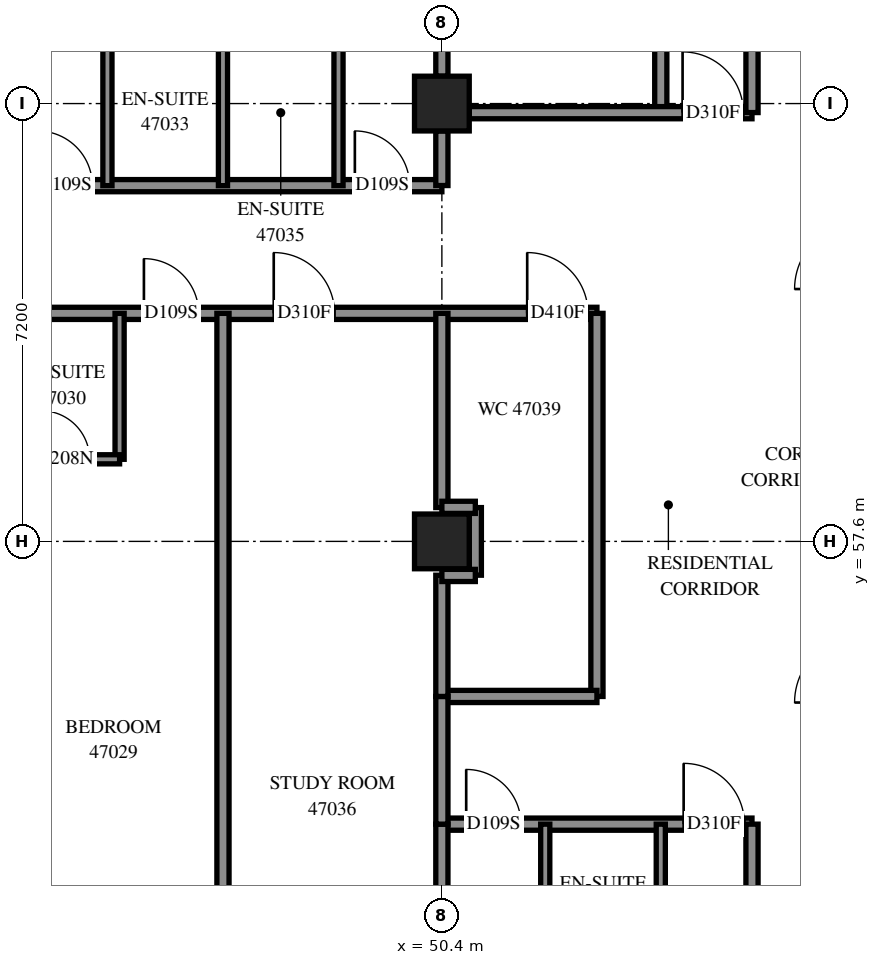
"""IFC4 building model, lengths in metres.
Left out: names, types, materials, properties, quantities, classifications, styles, units other than length and angle.
Written with IfcOpenShell. Run it as: python <this file> out.ifc"""

import sys

from ifc_helpers import new_model, si_unit, direction, frame, frame_2d, origin, origin_2d, place, context, subcontext, project, spatial, rectangle, extrude, element, fill, save


model = new_model("IFC4")
c1 = context("Model", 3, precision=1e-05, world=origin(), true_north=direction((0.0, 1.0)))
c2 = subcontext(c1, "Body", "Model", "MODEL_VIEW")
j1 = project(units=[si_unit("LENGTHUNIT", "METRE"), si_unit("PLANEANGLEUNIT", "RADIAN")], contexts=[c1])
p1 = place(None, origin())
s1 = spatial("IfcSite", under=j1, at=p1, CompositionType="ELEMENT")
p2 = place(p1, origin())
s2 = spatial("IfcBuilding", under=s1, at=p2, CompositionType="ELEMENT")
p3 = place(p2, frame((0.0, 0.0, 172.8)))
s3 = spatial("IfcBuildingStorey", under=s2, at=p3, CompositionType="ELEMENT", Elevation=172.8)
for number, where, z_axis, x_axis in (
    (1, (50.4, 57.6, 0.0), (0.0, 0.0, 1.0), (1.0, 0.0, 0.0)),
    (2, (50.4, 64.8, 0.0), (0.0, 0.0, 1.0), (1.0, 0.0, 0.0)),
):
    element("IfcColumn", number, at=place(p3, frame(where, z_axis=z_axis, x_axis=x_axis)), inside=s3, PredefinedType="COLUMN", context=c2, shape_type="SweptSolid", body=[
        extrude(rectangle(XDim=0.9, YDim=0.9, at=origin_2d()), origin(), (0.0, 0.0, 1.0), 3.1),
    ])
p4 = place(p3, frame((36.0, 61.35, 0.0), z_axis=(0.0, 0.0, 1.0), x_axis=(1.0, 0.0, 0.0)))
e3 = element("IfcWall", 3, at=p4, inside=s3, PredefinedType="PARTITIONING", context=c2, shape_type="SweptSolid", body=[
    extrude(rectangle(XDim=16.95, YDim=0.2, at=frame_2d((8.475, 0.0))), origin(), (0.0, 0.0, 1.0), 3.1),
])
p5 = place(p4, frame((2.3, 0.0, 0.0)))
e4 = element("IfcOpeningElement", 4, at=p5, cuts=e3, PredefinedType="OPENING", context=c2, shape_type="SweptSolid", body=[
    extrude(rectangle(XDim=0.9, YDim=2.1, at=frame_2d((0.45, 1.05))), frame((0.0, 0.11, 0.0), z_axis=(0.0, -1.0, 0.0), x_axis=(1.0, 0.0, 0.0)), (0.0, 0.0, 1.0), 0.22),
])
p6 = place(p4, frame((4.125, 0.0, 0.0)))
e5 = element("IfcOpeningElement", 5, at=p6, cuts=e3, PredefinedType="OPENING", context=c2, shape_type="SweptSolid", body=[
    extrude(rectangle(XDim=1.0, YDim=2.1, at=frame_2d((0.5, 1.05))), frame((0.0, 0.11, 0.0), z_axis=(0.0, -1.0, 0.0), x_axis=(1.0, 0.0, 0.0)), (0.0, 0.0, 1.0), 0.22),
])
p7 = place(p4, frame((9.5, 0.0, 0.0)))
e6 = element("IfcOpeningElement", 6, at=p7, cuts=e3, PredefinedType="OPENING", context=c2, shape_type="SweptSolid", body=[
    extrude(rectangle(XDim=0.9, YDim=2.1, at=frame_2d((0.45, 1.05))), frame((0.0, 0.11, 0.0), z_axis=(0.0, -1.0, 0.0), x_axis=(1.0, 0.0, 0.0)), (0.0, 0.0, 1.0), 0.22),
])
p8 = place(p4, frame((11.635, 0.0, 0.0)))
e7 = element("IfcOpeningElement", 7, at=p8, cuts=e3, PredefinedType="OPENING", context=c2, shape_type="SweptSolid", body=[
    extrude(rectangle(XDim=1.0, YDim=2.1, at=frame_2d((0.5, 1.05))), frame((0.0, 0.11, 0.0), z_axis=(0.0, -1.0, 0.0), x_axis=(1.0, 0.0, 0.0)), (0.0, 0.0, 1.0), 0.22),
])
p9 = place(p4, frame((15.803, 0.0, 0.0)))
e8 = element("IfcOpeningElement", 8, at=p9, cuts=e3, PredefinedType="OPENING", context=c2, shape_type="SweptSolid", body=[
    extrude(rectangle(XDim=1.0, YDim=2.1, at=frame_2d((0.5, 1.05))), frame((0.0, 0.11, 0.0), z_axis=(0.0, -1.0, 0.0), x_axis=(1.0, 0.0, 0.0)), (0.0, 0.0, 1.0), 0.22),
])
p10 = place(p3, frame((46.8, 49.7, 0.0), z_axis=(0.0, 0.0, 1.0), x_axis=(0.0, 1.0, 0.0)))
e9 = element("IfcWall", 9, at=p10, inside=s3, PredefinedType="PARTITIONING", context=c2, shape_type="SweptSolid", body=[
    extrude(rectangle(XDim=11.65, YDim=0.2, at=frame_2d((5.825, 0.0))), origin(), (0.0, 0.0, 1.0), 3.1),
])
p11 = place(p3, frame((40.65, 63.45, 0.0), z_axis=(0.0, 0.0, 1.0), x_axis=(1.0, 0.0, 0.0)))
e10 = element("IfcWall", 10, at=p11, inside=s3, PredefinedType="PARTITIONING", context=c2, shape_type="SweptSolid", body=[
    extrude(rectangle(XDim=9.75, YDim=0.2, at=frame_2d((4.875, 0.0))), origin(), (0.0, 0.0, 1.0), 3.1),
])
p12 = place(p11, frame((0.144, 0.0, 0.0)))
e11 = element("IfcOpeningElement", 11, at=p12, cuts=e10, PredefinedType="OPENING", context=c2, shape_type="SweptSolid", body=[
    extrude(rectangle(XDim=1.0, YDim=2.1, at=frame_2d((0.5, 1.05))), frame((0.0, 0.11, 0.0), z_axis=(0.0, -1.0, 0.0), x_axis=(1.0, 0.0, 0.0)), (0.0, 0.0, 1.0), 0.22),
])
p13 = place(p11, frame((3.102, 0.0, 0.0)))
e12 = element("IfcOpeningElement", 12, at=p13, cuts=e10, PredefinedType="OPENING", context=c2, shape_type="SweptSolid", body=[
    extrude(rectangle(XDim=0.9, YDim=2.1, at=frame_2d((0.45, 1.05))), frame((0.0, 0.11, 0.0), z_axis=(0.0, -1.0, 0.0), x_axis=(1.0, 0.0, 0.0)), (0.0, 0.0, 1.0), 0.22),
])
p14 = place(p11, frame((8.319, 0.0, 0.0)))
e13 = element("IfcOpeningElement", 13, at=p14, cuts=e10, PredefinedType="OPENING", context=c2, shape_type="SweptSolid", body=[
    extrude(rectangle(XDim=0.9, YDim=2.1, at=frame_2d((0.45, 1.05))), frame((0.0, 0.11, 0.0), z_axis=(0.0, -1.0, 0.0), x_axis=(1.0, 0.0, 0.0)), (0.0, 0.0, 1.0), 0.22),
])
p15 = place(p3, frame((54.0, 64.65, 0.0), z_axis=(0.0, 0.0, 1.0), x_axis=(0.0, 1.0, 0.0)))
e14 = element("IfcWall", 14, at=p15, inside=s3, PredefinedType="PARTITIONING", context=c2, shape_type="SweptSolid", body=[
    extrude(rectangle(XDim=8.126, YDim=0.2, at=frame_2d((4.063, 0.0))), origin(), (0.0, 0.0, 1.0), 3.1),
])
for number, where, z_axis, x_axis in (
    (15, (52.95, 55.05, 0.0), (0.0, 0.0, 1.0), (0.0, 1.0, 0.0)),
    (16, (50.4, 65.25, 0.0), (0.0, 0.0, 1.0), (0.0, 1.0, 0.0)),
):
    element("IfcWall", number, at=place(p3, frame(where, z_axis=z_axis, x_axis=x_axis)), inside=s3, PredefinedType="PARTITIONING", context=c2, shape_type="SweptSolid", body=[
        extrude(rectangle(XDim=6.3, YDim=0.2, at=frame_2d((3.15, 0.0))), origin(), (0.0, 0.0, 1.0), 3.1),
    ])
p16 = place(p3, frame((50.4, 52.95, 0.0), z_axis=(0.0, 0.0, 1.0), x_axis=(1.0, 0.0, 0.0)))
e17 = element("IfcWall", 17, at=p16, inside=s3, PredefinedType="PARTITIONING", context=c2, shape_type="SweptSolid", body=[
    extrude(rectangle(XDim=5.1, YDim=0.2, at=frame_2d((2.55, 0.0))), origin(), (0.0, 0.0, 1.0), 3.1),
])
p17 = place(p16, frame((0.4, 0.0, 0.0)))
e18 = element("IfcOpeningElement", 18, at=p17, cuts=e17, PredefinedType="OPENING", context=c2, shape_type="SweptSolid", body=[
    extrude(rectangle(XDim=0.9, YDim=2.1, at=frame_2d((0.45, 1.05))), frame((0.0, 0.11, 0.0), z_axis=(0.0, -1.0, 0.0), x_axis=(1.0, 0.0, 0.0)), (0.0, 0.0, 1.0), 0.22),
])
p18 = place(p16, frame((3.976, 0.0, 0.0)))
e19 = element("IfcOpeningElement", 19, at=p18, cuts=e17, PredefinedType="OPENING", context=c2, shape_type="SweptSolid", body=[
    extrude(rectangle(XDim=1.0, YDim=2.1, at=frame_2d((0.5, 1.05))), frame((0.0, 0.11, 0.0), z_axis=(0.0, -1.0, 0.0), x_axis=(1.0, 0.0, 0.0)), (0.0, 0.0, 1.0), 0.22),
])
p19 = place(p3, frame((55.5, 48.3, 0.0), z_axis=(0.0, 0.0, 1.0), x_axis=(0.0, 1.0, 0.0)))
e20 = element("IfcWall", 20, at=p19, inside=s3, PredefinedType="PARTITIONING", context=c2, shape_type="SweptSolid", body=[
    extrude(rectangle(XDim=4.65, YDim=0.2, at=frame_2d((2.325, 0.0))), origin(), (0.0, 0.0, 1.0), 3.1),
])
p20 = place(p3, frame((50.85, 64.65, 0.0), z_axis=(0.0, 0.0, 1.0), x_axis=(1.0, 0.0, 0.0)))
e21 = element("IfcWall", 21, at=p20, inside=s3, PredefinedType="PARTITIONING", context=c2, shape_type="SweptSolid", body=[
    extrude(rectangle(XDim=4.65, YDim=0.2, at=frame_2d((2.325, 0.0))), origin(), (0.0, 0.0, 1.0), 3.1),
])
p21 = place(p20, frame((3.509, 0.0, 0.0)))
e22 = element("IfcOpeningElement", 22, at=p21, cuts=e21, PredefinedType="OPENING", context=c2, shape_type="SweptSolid", body=[
    extrude(rectangle(XDim=1.0, YDim=2.1, at=frame_2d((0.5, 1.05))), frame((0.0, 0.11, 0.0), z_axis=(0.0, -1.0, 0.0), x_axis=(1.0, 0.0, 0.0)), (0.0, 0.0, 1.0), 0.22),
])
p22 = place(p3, frame((50.4, 58.156, 0.0), z_axis=(0.0, 0.0, 1.0), x_axis=(0.0, 1.0, 0.0)))
e23 = element("IfcWall", 23, at=p22, inside=s3, PredefinedType="PARTITIONING", context=c2, shape_type="SweptSolid", body=[
    extrude(rectangle(XDim=3.194, YDim=0.2, at=frame_2d((1.597, 0.0))), origin(), (0.0, 0.0, 1.0), 3.1),
])
p23 = place(p3, frame((50.4, 55.05, 0.0), z_axis=(0.0, 0.0, 1.0), x_axis=(1.0, 0.0, 0.0)))
e24 = element("IfcWall", 24, at=p23, inside=s3, PredefinedType="PARTITIONING", context=c2, shape_type="SweptSolid", body=[
    extrude(rectangle(XDim=2.55, YDim=0.2, at=frame_2d((1.275, 0.0))), origin(), (0.0, 0.0, 1.0), 3.1),
])
for number, where, z_axis, x_axis in (
    (25, (52.1, 50.55, 0.0), (0.0, 0.0, 1.0), (0.0, 1.0, 0.0)),
    (26, (54.0, 50.55, 0.0), (0.0, 0.0, 1.0), (0.0, 1.0, 0.0)),
    (27, (45.1, 58.95, 0.0), (0.0, 0.0, 1.0), (0.0, 1.0, 0.0)),
    (28, (44.9, 63.45, 0.0), (0.0, 0.0, 1.0), (0.0, 1.0, 0.0)),
    (29, (46.8, 63.45, 0.0), (0.0, 0.0, 1.0), (0.0, 1.0, 0.0)),
    (30, (48.7, 63.45, 0.0), (0.0, 0.0, 1.0), (0.0, 1.0, 0.0)),
):
    element("IfcWall", number, at=place(p3, frame(where, z_axis=z_axis, x_axis=x_axis)), inside=s3, PredefinedType="PARTITIONING", context=c2, shape_type="SweptSolid", body=[
        extrude(rectangle(XDim=2.4, YDim=0.15, at=frame_2d((1.2, 0.0))), origin(), (0.0, 0.0, 1.0), 3.1),
    ])
p24 = place(p3, frame((55.5, 64.652, 0.0), z_axis=(0.0, 0.0, 1.0), x_axis=(0.0, 1.0, 0.0)))
e31 = element("IfcWall", 31, at=p24, inside=s3, PredefinedType="PARTITIONING", context=c2, shape_type="SweptSolid", body=[
    extrude(rectangle(XDim=2.248, YDim=0.2, at=frame_2d((1.124, 0.0))), origin(), (0.0, 0.0, 1.0), 3.1),
])
for number, where, z_axis, x_axis in (
    (32, (50.4, 50.85, 0.0), (0.0, 0.0, 1.0), (0.0, 1.0, 0.0)),
    (33, (50.4, 52.95, 0.0), (0.0, 0.0, 1.0), (0.0, 1.0, 0.0)),
):
    element("IfcWall", number, at=place(p3, frame(where, z_axis=z_axis, x_axis=x_axis)), inside=s3, PredefinedType="PARTITIONING", context=c2, shape_type="SweptSolid", body=[
        extrude(rectangle(XDim=2.1, YDim=0.2, at=frame_2d((1.05, 0.0))), origin(), (0.0, 0.0, 1.0), 3.1),
    ])
p25 = place(p3, frame((50.4, 55.05, 0.0), z_axis=(0.0, 0.0, 1.0), x_axis=(0.0, 1.0, 0.0)))
e34 = element("IfcWall", 34, at=p25, inside=s3, PredefinedType="PARTITIONING", context=c2, shape_type="SweptSolid", body=[
    extrude(rectangle(XDim=1.994, YDim=0.2, at=frame_2d((0.997, 0.0))), origin(), (0.0, 0.0, 1.0), 3.1),
])
p26 = place(p3, frame((43.2, 58.95, 0.0), z_axis=(0.0, 0.0, 1.0), x_axis=(1.0, 0.0, 0.0)))
e35 = element("IfcWall", 35, at=p26, inside=s3, PredefinedType="PARTITIONING", context=c2, shape_type="SweptSolid", body=[
    extrude(rectangle(XDim=1.9, YDim=0.15, at=frame_2d((0.95, 0.0))), origin(), (0.0, 0.0, 1.0), 3.1),
])
p27 = place(p26, frame((0.607, 0.0, 0.0)))
e36 = element("IfcOpeningElement", 36, at=p27, cuts=e35, PredefinedType="OPENING", context=c2, shape_type="SweptSolid", body=[
    extrude(rectangle(XDim=0.8, YDim=2.1, at=frame_2d((0.4, 1.05))), frame((0.0, 0.085, 0.0), z_axis=(0.0, -1.0, 0.0), x_axis=(1.0, 0.0, 0.0)), (0.0, 0.0, 1.0), 0.17),
])
p28 = place(p3, frame((50.95, 57.044, 0.0), z_axis=(0.0, 0.0, 1.0), x_axis=(0.0, 1.0, 0.0)))
e37 = element("IfcWall", 37, at=p28, inside=s3, PredefinedType="PARTITIONING", context=c2, shape_type="SweptSolid", body=[
    extrude(rectangle(XDim=1.112, YDim=0.2, at=frame_2d((0.556, 0.0))), origin(), (0.0, 0.0, 1.0), 3.1),
])
p29 = place(p3, frame((50.4, 63.452, 0.0), z_axis=(0.0, 0.0, 1.0), x_axis=(0.0, 1.0, 0.0)))
e38 = element("IfcWall", 38, at=p29, inside=s3, PredefinedType="PARTITIONING", context=c2, shape_type="SweptSolid", body=[
    extrude(rectangle(XDim=0.898, YDim=0.2, at=frame_2d((0.449, 0.0))), origin(), (0.0, 0.0, 1.0), 3.1),
])
for number, where, z_axis, x_axis in (
    (39, (50.4, 58.16, 0.0), (0.0, 0.0, 1.0), (1.0, 0.0, 0.0)),
    (40, (50.4, 57.04, 0.0), (0.0, 0.0, 1.0), (1.0, 0.0, 0.0)),
):
    element("IfcWall", number, at=place(p3, frame(where, z_axis=z_axis, x_axis=x_axis)), inside=s3, PredefinedType="PARTITIONING", context=c2, shape_type="SweptSolid", body=[
        extrude(rectangle(XDim=0.55, YDim=0.2, at=frame_2d((0.275, 0.0))), origin(), (0.0, 0.0, 1.0), 3.1),
    ])
p30 = place(p7, origin())
e41 = element("IfcDoor", 41, at=p30, inside=s3, OperationType="SINGLE_SWING_LEFT", PredefinedType="DOOR", context=c2, shape_type="SweptSolid", body=[
    extrude(rectangle(XDim=0.9, YDim=2.1, at=frame_2d((0.45, 1.05))), frame((0.0, 0.025, 0.0), z_axis=(0.0, -1.0, 0.0), x_axis=(1.0, 0.0, 0.0)), (0.0, 0.0, 1.0), 0.05),
])
fill(e6, e41)
p31 = place(p27, origin())
e42 = element("IfcDoor", 42, at=p31, inside=s3, OperationType="SINGLE_SWING_RIGHT", PredefinedType="DOOR", context=c2, shape_type="SweptSolid", body=[
    extrude(rectangle(XDim=0.8, YDim=2.1, at=frame_2d((0.4, 1.05))), frame((0.0, 0.025, 0.0), z_axis=(0.0, -1.0, 0.0), x_axis=(1.0, 0.0, 0.0)), (0.0, 0.0, 1.0), 0.05),
])
fill(e36, e42)
p32 = place(p13, origin())
e43 = element("IfcDoor", 43, at=p32, inside=s3, OperationType="SINGLE_SWING_RIGHT", PredefinedType="DOOR", context=c2, shape_type="SweptSolid", body=[
    extrude(rectangle(XDim=0.9, YDim=2.1, at=frame_2d((0.45, 1.05))), frame((0.0, 0.025, 0.0), z_axis=(0.0, -1.0, 0.0), x_axis=(1.0, 0.0, 0.0)), (0.0, 0.0, 1.0), 0.05),
])
fill(e12, e43)
p33 = place(p14, origin())
e44 = element("IfcDoor", 44, at=p33, inside=s3, OperationType="SINGLE_SWING_LEFT", PredefinedType="DOOR", context=c2, shape_type="SweptSolid", body=[
    extrude(rectangle(XDim=0.9, YDim=2.1, at=frame_2d((0.45, 1.05))), frame((0.0, 0.025, 0.0), z_axis=(0.0, -1.0, 0.0), x_axis=(1.0, 0.0, 0.0)), (0.0, 0.0, 1.0), 0.05),
])
fill(e13, e44)
p34 = place(p8, origin())
e45 = element("IfcDoor", 45, at=p34, inside=s3, OperationType="SINGLE_SWING_RIGHT", PredefinedType="DOOR", context=c2, shape_type="SweptSolid", body=[
    extrude(rectangle(XDim=1.0, YDim=2.1, at=frame_2d((0.5, 1.05))), frame((0.0, 0.025, 0.0), z_axis=(0.0, -1.0, 0.0), x_axis=(1.0, 0.0, 0.0)), (0.0, 0.0, 1.0), 0.05),
])
fill(e7, e45)
p35 = place(p21, origin())
e46 = element("IfcDoor", 46, at=p35, inside=s3, OperationType="SINGLE_SWING_LEFT", PredefinedType="DOOR", context=c2, shape_type="SweptSolid", body=[
    extrude(rectangle(XDim=1.0, YDim=2.1, at=frame_2d((0.5, 1.05))), frame((0.0, 0.025, 0.0), z_axis=(0.0, -1.0, 0.0), x_axis=(1.0, 0.0, 0.0)), (0.0, 0.0, 1.0), 0.05),
])
fill(e22, e46)
p36 = place(p9, origin())
e47 = element("IfcDoor", 47, at=p36, inside=s3, OperationType="SINGLE_SWING_LEFT", PredefinedType="DOOR", context=c2, shape_type="SweptSolid", body=[
    extrude(rectangle(XDim=1.0, YDim=2.1, at=frame_2d((0.5, 1.05))), frame((0.0, 0.025, 0.0), z_axis=(0.0, -1.0, 0.0), x_axis=(1.0, 0.0, 0.0)), (0.0, 0.0, 1.0), 0.05),
])
fill(e8, e47)
p37 = place(p17, origin())
e48 = element("IfcDoor", 48, at=p37, inside=s3, OperationType="SINGLE_SWING_LEFT", PredefinedType="DOOR", context=c2, shape_type="SweptSolid", body=[
    extrude(rectangle(XDim=0.9, YDim=2.1, at=frame_2d((0.45, 1.05))), frame((0.0, 0.025, 0.0), z_axis=(0.0, -1.0, 0.0), x_axis=(1.0, 0.0, 0.0)), (0.0, 0.0, 1.0), 0.05),
])
fill(e18, e48)
p38 = place(p18, origin())
e49 = element("IfcDoor", 49, at=p38, inside=s3, OperationType="SINGLE_SWING_RIGHT", PredefinedType="DOOR", context=c2, shape_type="SweptSolid", body=[
    extrude(rectangle(XDim=1.0, YDim=2.1, at=frame_2d((0.5, 1.05))), frame((0.0, 0.025, 0.0), z_axis=(0.0, -1.0, 0.0), x_axis=(1.0, 0.0, 0.0)), (0.0, 0.0, 1.0), 0.05),
])
fill(e19, e49)
save(model, sys.argv[1])
